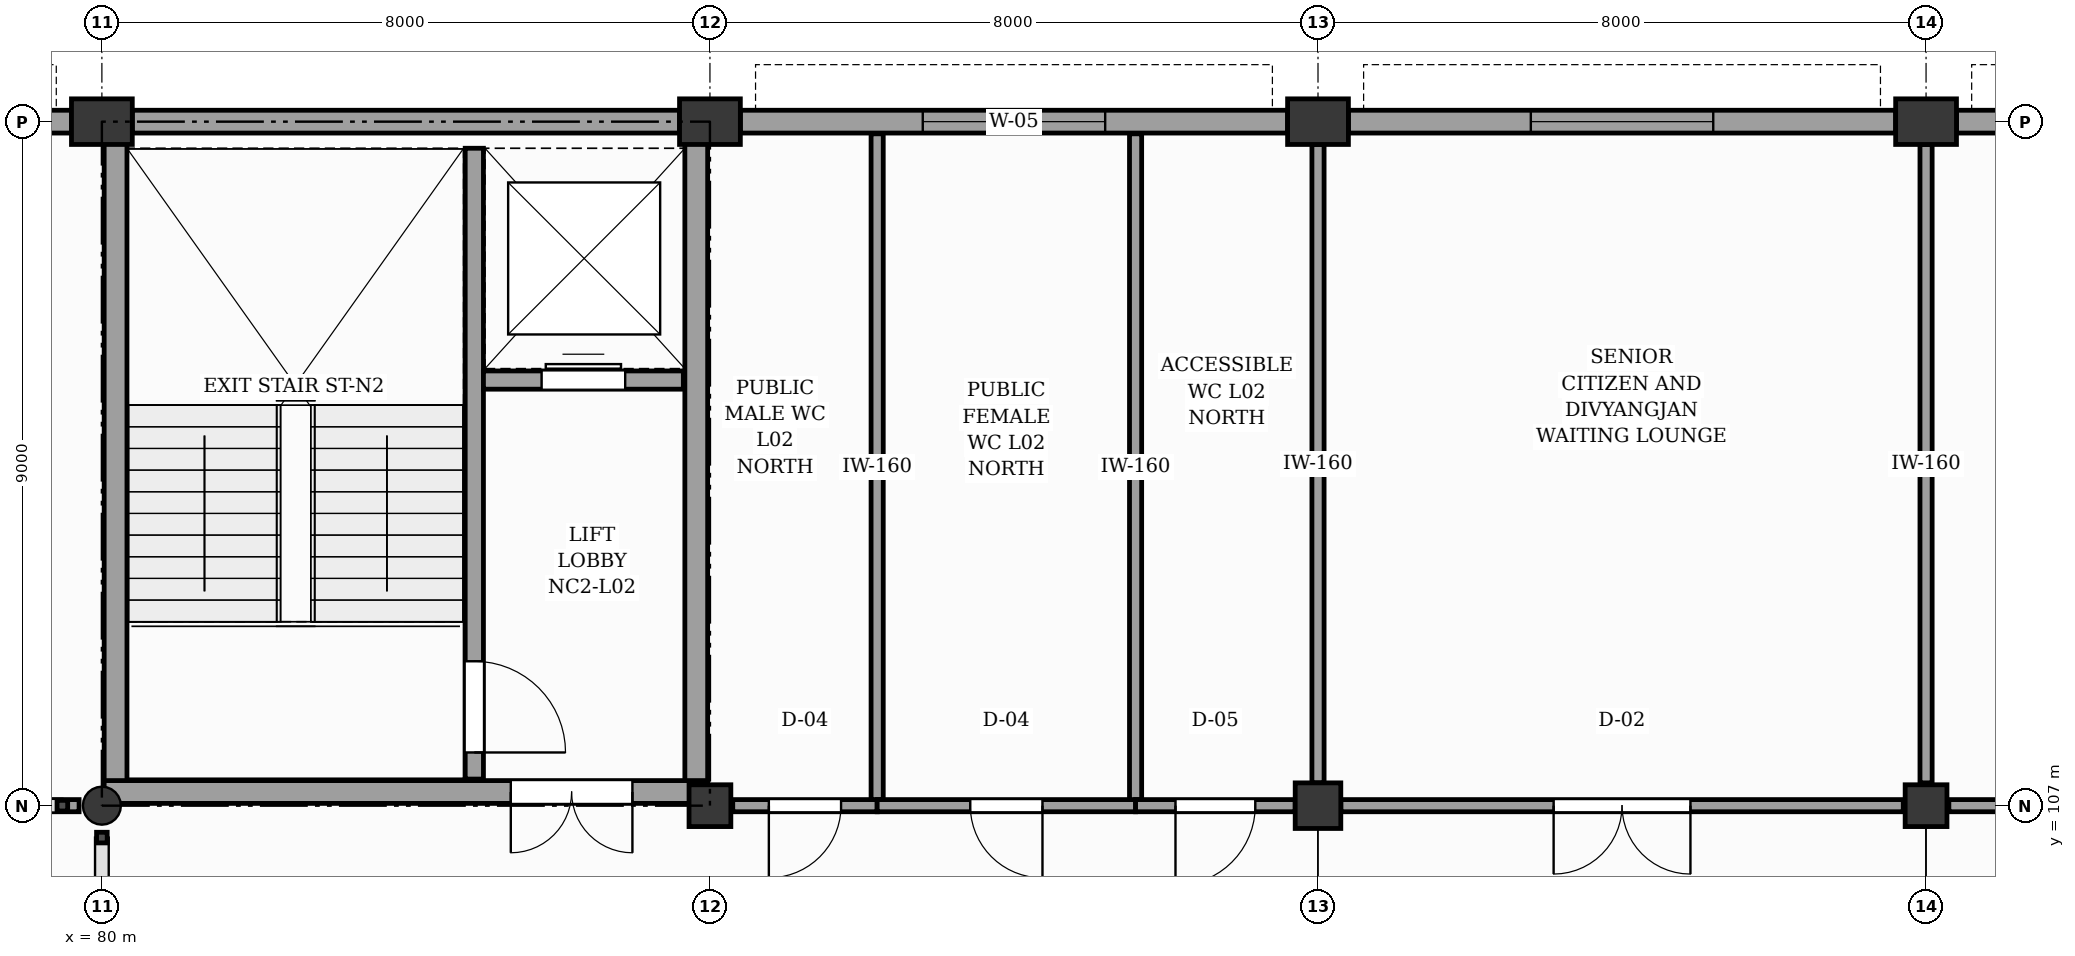
"""IFC4 building model, lengths in metres.
Left out: names, types, materials, properties, quantities, classifications, styles, units other than length and angle.
Written with IfcOpenShell. Run it as: python <this file> out.ifc"""

import sys

from ifc_helpers import new_model, si_unit, direction, frame, frame_2d, origin, origin_2d, place, context, subcontext, project, spatial, rectangle, circle, extrude, element, fill, save


model = new_model("IFC4")
c1 = context("Model", 3, precision=1e-05, world=origin(), true_north=direction((0.0, 1.0)))
c2 = subcontext(c1, "Body", "Model", "MODEL_VIEW")
j1 = project(units=[si_unit("LENGTHUNIT", "METRE"), si_unit("PLANEANGLEUNIT", "RADIAN")], contexts=[c1])
p1 = place(None, origin())
s1 = spatial("IfcSite", under=j1, at=p1, CompositionType="ELEMENT")
p2 = place(p1, origin())
s2 = spatial("IfcBuilding", under=s1, at=p2, CompositionType="ELEMENT")
p3 = place(p2, frame((0.0, 0.0, 9.6)))
s3 = spatial("IfcBuildingStorey", under=s2, at=p3, CompositionType="ELEMENT", Elevation=9.6)
p4 = place(p3, frame((80.0, 107.0, 0.0), z_axis=(0.0, 0.0, 1.0), x_axis=(1.0, 0.0, 0.0)))
e1 = element("IfcColumn", 1, at=p4, inside=s3, PredefinedType="COLUMN", context=c2, shape_type="SweptSolid", body=[
    extrude(circle(Radius=0.25, at=origin_2d()), origin(), (0.0, 0.0, 1.0), 6.6),
])
p5 = place(p3, frame((80.0, 116.0, 0.0), z_axis=(0.0, 0.0, 1.0), x_axis=(1.0, 0.0, 0.0)))
e2 = element("IfcColumn", 2, at=p5, inside=s3, PredefinedType="PILASTER", context=c2, shape_type="SweptSolid", body=[
    extrude(rectangle(XDim=0.8, YDim=0.6, at=origin_2d()), origin(), (0.0, 0.0, 1.0), 6.6),
])
p6 = place(p3, frame((88.0, 107.0, 0.0), z_axis=(0.0, 0.0, 1.0), x_axis=(1.0, 0.0, 0.0)))
e3 = element("IfcColumn", 3, at=p6, inside=s3, PredefinedType="COLUMN", context=c2, shape_type="SweptSolid", body=[
    extrude(rectangle(XDim=0.55, YDim=0.55, at=origin_2d()), origin(), (0.0, 0.0, 1.0), 6.6),
])
p7 = place(p3, frame((88.0, 116.0, 0.0), z_axis=(0.0, 0.0, 1.0), x_axis=(1.0, 0.0, 0.0)))
e4 = element("IfcColumn", 4, at=p7, inside=s3, PredefinedType="PILASTER", context=c2, shape_type="SweptSolid", body=[
    extrude(rectangle(XDim=0.8, YDim=0.6, at=origin_2d()), origin(), (0.0, 0.0, 1.0), 6.6),
])
p8 = place(p3, frame((96.0, 107.0, 0.0), z_axis=(0.0, 0.0, 1.0), x_axis=(1.0, 0.0, 0.0)))
e5 = element("IfcColumn", 5, at=p8, inside=s3, PredefinedType="COLUMN", context=c2, shape_type="SweptSolid", body=[
    extrude(rectangle(XDim=0.6, YDim=0.6, at=origin_2d()), origin(), (0.0, 0.0, 1.0), 6.6),
])
p9 = place(p3, frame((96.0, 116.0, 0.0), z_axis=(0.0, 0.0, 1.0), x_axis=(1.0, 0.0, 0.0)))
e6 = element("IfcColumn", 6, at=p9, inside=s3, PredefinedType="PILASTER", context=c2, shape_type="SweptSolid", body=[
    extrude(rectangle(XDim=0.8, YDim=0.6, at=origin_2d()), origin(), (0.0, 0.0, 1.0), 6.6),
])
p10 = place(p3, frame((104.0, 107.0, 0.0), z_axis=(0.0, 0.0, 1.0), x_axis=(1.0, 0.0, 0.0)))
e7 = element("IfcColumn", 7, at=p10, inside=s3, PredefinedType="COLUMN", context=c2, shape_type="SweptSolid", body=[
    extrude(rectangle(XDim=0.55, YDim=0.55, at=origin_2d()), origin(), (0.0, 0.0, 1.0), 6.6),
])
p11 = place(p3, frame((104.0, 116.0, 0.0), z_axis=(0.0, 0.0, 1.0), x_axis=(1.0, 0.0, 0.0)))
e8 = element("IfcColumn", 8, at=p11, inside=s3, PredefinedType="PILASTER", context=c2, shape_type="SweptSolid", body=[
    extrude(rectangle(XDim=0.8, YDim=0.6, at=origin_2d()), origin(), (0.0, 0.0, 1.0), 6.6),
])
p12 = place(p3, frame((72.4, 116.0, 0.0), z_axis=(0.0, 0.0, 1.0), x_axis=(1.0, 0.0, 0.0)))
e9 = element("IfcWall", 9, at=p12, inside=s3, PredefinedType="SOLIDWALL", context=c2, shape_type="SweptSolid", body=[
    extrude(rectangle(XDim=7.2, YDim=0.3, at=frame_2d((3.6, 0.0))), origin(), (0.0, 0.0, 1.0), 5.64),
])
p13 = place(p12, frame((2.4, 0.0, 0.9)))
e10 = element("IfcOpeningElement", 10, at=p13, cuts=e9, PredefinedType="OPENING", context=c2, shape_type="SweptSolid", body=[
    extrude(rectangle(XDim=2.4, YDim=3.2, at=frame_2d((1.2, 1.6))), frame((0.0, 0.16, 0.0), z_axis=(0.0, -1.0, 0.0), x_axis=(1.0, 0.0, 0.0)), (0.0, 0.0, 1.0), 0.32),
])
p14 = place(p3, frame((80.4, 116.0, 0.0), z_axis=(0.0, 0.0, 1.0), x_axis=(1.0, 0.0, 0.0)))
e11 = element("IfcWall", 11, at=p14, inside=s3, PredefinedType="SOLIDWALL", context=c2, shape_type="SweptSolid", body=[
    extrude(rectangle(XDim=7.2, YDim=0.3, at=frame_2d((3.6, 0.0))), origin(), (0.0, 0.0, 1.0), 5.64),
])
p15 = place(p3, frame((88.4, 116.0, 0.0), z_axis=(0.0, 0.0, 1.0), x_axis=(1.0, 0.0, 0.0)))
e12 = element("IfcWall", 12, at=p15, inside=s3, PredefinedType="SOLIDWALL", context=c2, shape_type="SweptSolid", body=[
    extrude(rectangle(XDim=7.2, YDim=0.3, at=frame_2d((3.6, 0.0))), origin(), (0.0, 0.0, 1.0), 5.64),
])
p16 = place(p15, frame((2.4, 0.0, 0.9)))
e13 = element("IfcOpeningElement", 13, at=p16, cuts=e12, PredefinedType="OPENING", context=c2, shape_type="SweptSolid", body=[
    extrude(rectangle(XDim=2.4, YDim=3.2, at=frame_2d((1.2, 1.6))), frame((0.0, 0.16, 0.0), z_axis=(0.0, -1.0, 0.0), x_axis=(1.0, 0.0, 0.0)), (0.0, 0.0, 1.0), 0.32),
])
p17 = place(p3, frame((96.4, 116.0, 0.0), z_axis=(0.0, 0.0, 1.0), x_axis=(1.0, 0.0, 0.0)))
e14 = element("IfcWall", 14, at=p17, inside=s3, PredefinedType="SOLIDWALL", context=c2, shape_type="SweptSolid", body=[
    extrude(rectangle(XDim=7.2, YDim=0.3, at=frame_2d((3.6, 0.0))), origin(), (0.0, 0.0, 1.0), 5.64),
])
p18 = place(p17, frame((2.4, 0.0, 0.9)))
e15 = element("IfcOpeningElement", 15, at=p18, cuts=e14, PredefinedType="OPENING", context=c2, shape_type="SweptSolid", body=[
    extrude(rectangle(XDim=2.4, YDim=3.2, at=frame_2d((1.2, 1.6))), frame((0.0, 0.16, 0.0), z_axis=(0.0, -1.0, 0.0), x_axis=(1.0, 0.0, 0.0)), (0.0, 0.0, 1.0), 0.32),
])
p19 = place(p3, frame((104.4, 116.0, 0.0), z_axis=(0.0, 0.0, 1.0), x_axis=(1.0, 0.0, 0.0)))
e16 = element("IfcWall", 16, at=p19, inside=s3, PredefinedType="SOLIDWALL", context=c2, shape_type="SweptSolid", body=[
    extrude(rectangle(XDim=7.2, YDim=0.3, at=frame_2d((3.6, 0.0))), origin(), (0.0, 0.0, 1.0), 5.64),
])
p20 = place(p19, frame((2.4, 0.0, 0.9)))
e17 = element("IfcOpeningElement", 17, at=p20, cuts=e16, PredefinedType="OPENING", context=c2, shape_type="SweptSolid", body=[
    extrude(rectangle(XDim=2.4, YDim=3.2, at=frame_2d((1.2, 1.6))), frame((0.0, 0.16, 0.0), z_axis=(0.0, -1.0, 0.0), x_axis=(1.0, 0.0, 0.0)), (0.0, 0.0, 1.0), 0.32),
])
p21 = place(p3, frame((84.9, 107.35, 0.0), z_axis=(0.0, 0.0, 1.0), x_axis=(0.0, 1.0, 0.0)))
e18 = element("IfcWall", 18, at=p21, inside=s3, PredefinedType="SHEAR", context=c2, shape_type="SweptSolid", body=[
    extrude(rectangle(XDim=8.3, YDim=0.24, at=frame_2d((4.15, 0.0))), origin(), (0.0, 0.0, 1.0), 6.32),
])
p22 = place(p21, frame((0.35, 0.0, 0.0)))
e19 = element("IfcOpeningElement", 19, at=p22, cuts=e18, PredefinedType="OPENING", context=c2, shape_type="SweptSolid", body=[
    extrude(rectangle(XDim=1.2, YDim=2.15, at=frame_2d((0.6, 1.075))), frame((0.0, 0.13, 0.0), z_axis=(0.0, -1.0, 0.0), x_axis=(1.0, 0.0, 0.0)), (0.0, 0.0, 1.0), 0.26),
])
p23 = place(p3, frame((85.02, 112.6, 0.0), z_axis=(0.0, 0.0, 1.0), x_axis=(1.0, 0.0, 0.0)))
e20 = element("IfcWall", 20, at=p23, inside=s3, PredefinedType="SHEAR", context=c2, shape_type="SweptSolid", body=[
    extrude(rectangle(XDim=2.63, YDim=0.24, at=frame_2d((1.315, 0.0))), origin(), (0.0, 0.0, 1.0), 6.32),
])
p24 = place(p23, frame((0.765, 0.0, 0.0)))
e21 = element("IfcOpeningElement", 21, at=p24, cuts=e20, PredefinedType="OPENING", context=c2, shape_type="SweptSolid", body=[
    extrude(rectangle(XDim=1.1, YDim=2.15, at=frame_2d((0.55, 1.075))), frame((0.0, 0.13, 0.0), z_axis=(0.0, -1.0, 0.0), x_axis=(1.0, 0.0, 0.0)), (0.0, 0.0, 1.0), 0.26),
])
for number, where, z_axis, x_axis in (
    (22, (80.18, 107.18, 0.0), (0.0, 0.0, 1.0), (0.0, 1.0, 0.0)),
    (23, (87.82, 107.18, 0.0), (0.0, 0.0, 1.0), (0.0, 1.0, 0.0)),
):
    element("IfcWall", number, at=place(p3, frame(where, z_axis=z_axis, x_axis=x_axis)), inside=s3, PredefinedType="SHEAR", context=c2, shape_type="SweptSolid", body=[
        extrude(rectangle(XDim=8.64, YDim=0.3, at=frame_2d((4.32, 0.0))), origin(), (0.0, 0.0, 1.0), 6.32),
    ])
p25 = place(p3, frame((80.03, 107.18, 0.0), z_axis=(0.0, 0.0, 1.0), x_axis=(1.0, 0.0, 0.0)))
e24 = element("IfcWall", 24, at=p25, inside=s3, PredefinedType="SHEAR", context=c2, shape_type="SweptSolid", body=[
    extrude(rectangle(XDim=7.94, YDim=0.3, at=frame_2d((3.97, 0.0))), origin(), (0.0, 0.0, 1.0), 6.32),
])
p26 = place(p25, frame((5.35, 0.0, 0.0)))
e25 = element("IfcOpeningElement", 25, at=p26, cuts=e24, PredefinedType="OPENING", context=c2, shape_type="SweptSolid", body=[
    extrude(rectangle(XDim=1.6, YDim=2.15, at=frame_2d((0.8, 1.075))), frame((0.0, 0.16, 0.0), z_axis=(0.0, -1.0, 0.0), x_axis=(1.0, 0.0, 0.0)), (0.0, 0.0, 1.0), 0.32),
])
p27 = place(p3, frame((76.0, 107.0, 0.0), z_axis=(0.0, 0.0, 1.0), x_axis=(1.0, 0.0, 0.0)))
e26 = element("IfcWall", 26, at=p27, inside=s3, PredefinedType="PARTITIONING", context=c2, shape_type="SweptSolid", body=[
    extrude(rectangle(XDim=3.7, YDim=0.16, at=frame_2d((1.85, 0.0))), origin(), (0.0, 0.0, 1.0), 5.5),
])
p28 = place(p27, frame((0.2, 0.0, 0.0)))
e27 = element("IfcOpeningElement", 27, at=p28, cuts=e26, PredefinedType="OPENING", context=c2, shape_type="SweptSolid", body=[
    extrude(rectangle(XDim=1.8, YDim=2.25, at=frame_2d((0.9, 1.125))), frame((0.0, 0.09, 0.0), z_axis=(0.0, -1.0, 0.0), x_axis=(1.0, 0.0, 0.0)), (0.0, 0.0, 1.0), 0.18),
])
p29 = place(p3, frame((88.3, 107.0, 0.0), z_axis=(0.0, 0.0, 1.0), x_axis=(1.0, 0.0, 0.0)))
e28 = element("IfcWall", 28, at=p29, inside=s3, PredefinedType="PARTITIONING", context=c2, shape_type="SweptSolid", body=[
    extrude(rectangle(XDim=1.9, YDim=0.16, at=frame_2d((0.95, 0.0))), origin(), (0.0, 0.0, 1.0), 5.5),
])
p30 = place(p29, frame((0.475, 0.0, 0.0)))
e29 = element("IfcOpeningElement", 29, at=p30, cuts=e28, PredefinedType="OPENING", context=c2, shape_type="SweptSolid", body=[
    extrude(rectangle(XDim=0.95, YDim=2.1, at=frame_2d((0.475, 1.05))), frame((0.0, 0.09, 0.0), z_axis=(0.0, -1.0, 0.0), x_axis=(1.0, 0.0, 0.0)), (0.0, 0.0, 1.0), 0.18),
])
p31 = place(p3, frame((90.2, 107.08, 0.0), z_axis=(0.0, 0.0, 1.0), x_axis=(0.0, 1.0, 0.0)))
e30 = element("IfcWall", 30, at=p31, inside=s3, PredefinedType="PARTITIONING", context=c2, shape_type="SweptSolid", body=[
    extrude(rectangle(XDim=8.76, YDim=0.16, at=frame_2d((4.38, 0.0))), origin(), (0.0, 0.0, 1.0), 5.5),
])
p32 = place(p3, frame((90.2, 107.0, 0.0), z_axis=(0.0, 0.0, 1.0), x_axis=(1.0, 0.0, 0.0)))
e31 = element("IfcWall", 31, at=p32, inside=s3, PredefinedType="PARTITIONING", context=c2, shape_type="SweptSolid", body=[
    extrude(rectangle(XDim=3.4, YDim=0.16, at=frame_2d((1.7, 0.0))), origin(), (0.0, 0.0, 1.0), 5.5),
])
p33 = place(p32, frame((1.225, 0.0, 0.0)))
e32 = element("IfcOpeningElement", 32, at=p33, cuts=e31, PredefinedType="OPENING", context=c2, shape_type="SweptSolid", body=[
    extrude(rectangle(XDim=0.95, YDim=2.1, at=frame_2d((0.475, 1.05))), frame((0.0, 0.09, 0.0), z_axis=(0.0, -1.0, 0.0), x_axis=(1.0, 0.0, 0.0)), (0.0, 0.0, 1.0), 0.18),
])
p34 = place(p3, frame((93.6, 107.08, 0.0), z_axis=(0.0, 0.0, 1.0), x_axis=(0.0, 1.0, 0.0)))
e33 = element("IfcWall", 33, at=p34, inside=s3, PredefinedType="PARTITIONING", context=c2, shape_type="SweptSolid", body=[
    extrude(rectangle(XDim=8.76, YDim=0.16, at=frame_2d((4.38, 0.0))), origin(), (0.0, 0.0, 1.0), 5.5),
])
p35 = place(p3, frame((93.6, 107.0, 0.0), z_axis=(0.0, 0.0, 1.0), x_axis=(1.0, 0.0, 0.0)))
e34 = element("IfcWall", 34, at=p35, inside=s3, PredefinedType="PARTITIONING", context=c2, shape_type="SweptSolid", body=[
    extrude(rectangle(XDim=2.1, YDim=0.16, at=frame_2d((1.05, 0.0))), origin(), (0.0, 0.0, 1.0), 5.5),
])
p36 = place(p35, frame((0.525, 0.0, 0.0)))
e35 = element("IfcOpeningElement", 35, at=p36, cuts=e34, PredefinedType="OPENING", context=c2, shape_type="SweptSolid", body=[
    extrude(rectangle(XDim=1.05, YDim=2.1, at=frame_2d((0.525, 1.05))), frame((0.0, 0.09, 0.0), z_axis=(0.0, -1.0, 0.0), x_axis=(1.0, 0.0, 0.0)), (0.0, 0.0, 1.0), 0.18),
])
p37 = place(p3, frame((96.0, 107.3, 0.0), z_axis=(0.0, 0.0, 1.0), x_axis=(0.0, 1.0, 0.0)))
e36 = element("IfcWall", 36, at=p37, inside=s3, PredefinedType="PARTITIONING", context=c2, shape_type="SweptSolid", body=[
    extrude(rectangle(XDim=8.4, YDim=0.16, at=frame_2d((4.2, 0.0))), origin(), (0.0, 0.0, 1.0), 5.5),
])
p38 = place(p3, frame((96.3, 107.0, 0.0), z_axis=(0.0, 0.0, 1.0), x_axis=(1.0, 0.0, 0.0)))
e37 = element("IfcWall", 37, at=p38, inside=s3, PredefinedType="PARTITIONING", context=c2, shape_type="SweptSolid", body=[
    extrude(rectangle(XDim=7.4, YDim=0.16, at=frame_2d((3.7, 0.0))), origin(), (0.0, 0.0, 1.0), 5.5),
])
p39 = place(p38, frame((2.8, 0.0, 0.0)))
e38 = element("IfcOpeningElement", 38, at=p39, cuts=e37, PredefinedType="OPENING", context=c2, shape_type="SweptSolid", body=[
    extrude(rectangle(XDim=1.8, YDim=2.25, at=frame_2d((0.9, 1.125))), frame((0.0, 0.09, 0.0), z_axis=(0.0, -1.0, 0.0), x_axis=(1.0, 0.0, 0.0)), (0.0, 0.0, 1.0), 0.18),
])
p40 = place(p3, frame((104.0, 107.3, 0.0), z_axis=(0.0, 0.0, 1.0), x_axis=(0.0, 1.0, 0.0)))
e39 = element("IfcWall", 39, at=p40, inside=s3, PredefinedType="PARTITIONING", context=c2, shape_type="SweptSolid", body=[
    extrude(rectangle(XDim=8.4, YDim=0.16, at=frame_2d((4.2, 0.0))), origin(), (0.0, 0.0, 1.0), 5.5),
])
p41 = place(p3, frame((104.3, 107.0, 0.0), z_axis=(0.0, 0.0, 1.0), x_axis=(1.0, 0.0, 0.0)))
e40 = element("IfcWall", 40, at=p41, inside=s3, PredefinedType="PARTITIONING", context=c2, shape_type="SweptSolid", body=[
    extrude(rectangle(XDim=7.4, YDim=0.16, at=frame_2d((3.7, 0.0))), origin(), (0.0, 0.0, 1.0), 5.5),
])
p42 = place(p41, frame((2.7, 0.0, 0.0)))
e41 = element("IfcOpeningElement", 41, at=p42, cuts=e40, PredefinedType="OPENING", context=c2, shape_type="SweptSolid", body=[
    extrude(rectangle(XDim=2.0, YDim=2.3, at=frame_2d((1.0, 1.15))), frame((0.0, 0.09, 0.0), z_axis=(0.0, -1.0, 0.0), x_axis=(1.0, 0.0, 0.0)), (0.0, 0.0, 1.0), 0.18),
])
p43 = place(p16, origin())
e42 = element("IfcWindow", 42, at=p43, inside=s3, PartitioningType="SINGLE_PANEL", PredefinedType="WINDOW", context=c2, shape_type="SweptSolid", body=[
    extrude(rectangle(XDim=2.4, YDim=3.2, at=frame_2d((1.2, 1.6))), frame((0.0, 0.03, 0.0), z_axis=(0.0, -1.0, 0.0), x_axis=(1.0, 0.0, 0.0)), (0.0, 0.0, 1.0), 0.06),
])
fill(e13, e42)
p44 = place(p18, origin())
e43 = element("IfcWindow", 43, at=p44, inside=s3, PartitioningType="SINGLE_PANEL", PredefinedType="WINDOW", context=c2, shape_type="SweptSolid", body=[
    extrude(rectangle(XDim=2.4, YDim=3.2, at=frame_2d((1.2, 1.6))), frame((0.0, 0.03, 0.0), z_axis=(0.0, -1.0, 0.0), x_axis=(1.0, 0.0, 0.0)), (0.0, 0.0, 1.0), 0.06),
])
fill(e15, e43)
p45 = place(p22, frame((1.2, 0.0, 0.0), z_axis=(0.0, 0.0, 1.0), x_axis=(-1.0, 0.0, 0.0)))
e44 = element("IfcDoor", 44, at=p45, inside=s3, OperationType="SINGLE_SWING_LEFT", PredefinedType="DOOR", context=c2, shape_type="SweptSolid", body=[
    extrude(rectangle(XDim=1.2, YDim=2.15, at=frame_2d((0.6, 1.075))), frame((0.0, 0.025, 0.0), z_axis=(0.0, -1.0, 0.0), x_axis=(1.0, 0.0, 0.0)), (0.0, 0.0, 1.0), 0.05),
])
fill(e19, e44)
p46 = place(p24, origin())
e45 = element("IfcDoor", 45, at=p46, inside=s3, OperationType="DOUBLE_DOOR_SLIDING", PredefinedType="DOOR", context=c2, shape_type="SweptSolid", body=[
    extrude(rectangle(XDim=1.1, YDim=2.15, at=frame_2d((0.55, 1.075))), frame((0.0, 0.025, 0.0), z_axis=(0.0, -1.0, 0.0), x_axis=(1.0, 0.0, 0.0)), (0.0, 0.0, 1.0), 0.05),
])
fill(e21, e45)
p47 = place(p26, frame((1.6, 0.0, 0.0), z_axis=(0.0, 0.0, 1.0), x_axis=(-1.0, 0.0, 0.0)))
e46 = element("IfcDoor", 46, at=p47, inside=s3, OperationType="DOUBLE_DOOR_SINGLE_SWING", PredefinedType="DOOR", context=c2, shape_type="SweptSolid", body=[
    extrude(rectangle(XDim=1.6, YDim=2.15, at=frame_2d((0.8, 1.075))), frame((0.0, 0.025, 0.0), z_axis=(0.0, -1.0, 0.0), x_axis=(1.0, 0.0, 0.0)), (0.0, 0.0, 1.0), 0.05),
])
fill(e25, e46)
p48 = place(p30, frame((0.95, 0.0, 0.0), z_axis=(0.0, 0.0, 1.0), x_axis=(-1.0, 0.0, 0.0)))
e47 = element("IfcDoor", 47, at=p48, inside=s3, OperationType="SINGLE_SWING_LEFT", PredefinedType="DOOR", context=c2, shape_type="SweptSolid", body=[
    extrude(rectangle(XDim=0.95, YDim=2.1, at=frame_2d((0.475, 1.05))), frame((0.0, 0.025, 0.0), z_axis=(0.0, -1.0, 0.0), x_axis=(1.0, 0.0, 0.0)), (0.0, 0.0, 1.0), 0.05),
])
fill(e29, e47)
p49 = place(p33, frame((0.95, 0.0, 0.0), z_axis=(0.0, 0.0, 1.0), x_axis=(-1.0, 0.0, 0.0)))
e48 = element("IfcDoor", 48, at=p49, inside=s3, OperationType="SINGLE_SWING_RIGHT", PredefinedType="DOOR", context=c2, shape_type="SweptSolid", body=[
    extrude(rectangle(XDim=0.95, YDim=2.1, at=frame_2d((0.475, 1.05))), frame((0.0, 0.025, 0.0), z_axis=(0.0, -1.0, 0.0), x_axis=(1.0, 0.0, 0.0)), (0.0, 0.0, 1.0), 0.05),
])
fill(e32, e48)
p50 = place(p36, frame((1.05, 0.0, 0.0), z_axis=(0.0, 0.0, 1.0), x_axis=(-1.0, 0.0, 0.0)))
e49 = element("IfcDoor", 49, at=p50, inside=s3, OperationType="SINGLE_SWING_LEFT", PredefinedType="DOOR", context=c2, shape_type="SweptSolid", body=[
    extrude(rectangle(XDim=1.05, YDim=2.1, at=frame_2d((0.525, 1.05))), frame((0.0, 0.025, 0.0), z_axis=(0.0, -1.0, 0.0), x_axis=(1.0, 0.0, 0.0)), (0.0, 0.0, 1.0), 0.05),
])
fill(e35, e49)
p51 = place(p39, frame((1.8, 0.0, 0.0), z_axis=(0.0, 0.0, 1.0), x_axis=(-1.0, 0.0, 0.0)))
e50 = element("IfcDoor", 50, at=p51, inside=s3, OperationType="DOUBLE_DOOR_SINGLE_SWING", PredefinedType="DOOR", context=c2, shape_type="SweptSolid", body=[
    extrude(rectangle(XDim=1.8, YDim=2.25, at=frame_2d((0.9, 1.125))), frame((0.0, 0.025, 0.0), z_axis=(0.0, -1.0, 0.0), x_axis=(1.0, 0.0, 0.0)), (0.0, 0.0, 1.0), 0.05),
])
fill(e38, e50)
save(model, sys.argv[1])
